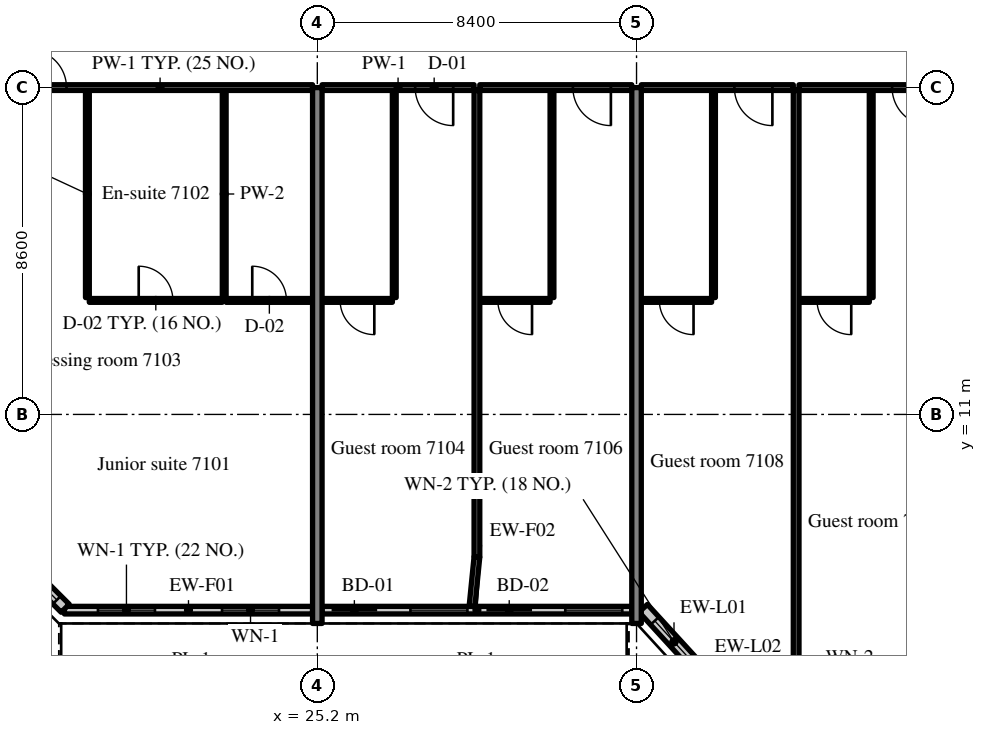
"""IFC4 building model, lengths in metres.
Left out: names, types, materials, properties, quantities, classifications, styles, units other than length and angle.
Written with IfcOpenShell. Run it as: python <this file> out.ifc"""

import sys

from ifc_helpers import new_model, si_unit, direction, frame, frame_2d, origin, place, context, subcontext, project, spatial, rectangle, extrude, source, transform, mapped, element, fill, save


model = new_model("IFC4")
c1 = context("Model", 3, precision=1e-05, world=origin(), true_north=direction((0.0, 1.0)))
c2 = subcontext(c1, "Body", "Model", "MODEL_VIEW")
j1 = project(units=[si_unit("LENGTHUNIT", "METRE"), si_unit("PLANEANGLEUNIT", "RADIAN")], contexts=[c1])
p1 = place(None, origin())
s1 = spatial("IfcSite", under=j1, at=p1, CompositionType="ELEMENT")
p2 = place(p1, origin())
s2 = spatial("IfcBuilding", under=s1, at=p2, CompositionType="ELEMENT")
p3 = place(p2, frame((0.0, 0.0, 297.7)))
s3 = spatial("IfcBuildingStorey", under=s2, at=p3, CompositionType="ELEMENT", Elevation=297.7)
m1 = source(origin(), c2, "Body", "SweptSolid", [
    extrude(rectangle(XDim=14.1, YDim=0.25, at=frame_2d((7.05, 0.0))), origin(), (0.0, 0.0, 1.0), 3.72),
])
for number, where, z_axis, x_axis in (
    (1, (25.2, 5.5, 0.0), (0.0, 0.0, 1.0), (0.0, 1.0, 0.0)),
    (2, (33.6, 5.5, 0.0), (0.0, 0.0, 1.0), (0.0, 1.0, 0.0)),
):
    element("IfcWall", number, at=place(p3, frame(where, z_axis=z_axis, x_axis=x_axis)), inside=s3, PredefinedType="SHEAR", context=c2, shape_type="MappedRepresentation", body=[
        mapped(m1, transform((0.0, 0.0, 0.0), scale=1.0)),
    ])
m2 = source(origin(), c2, "Body", "SweptSolid", [
    extrude(rectangle(XDim=6.53, YDim=0.2, at=frame_2d((3.265, 0.0))), origin(), (0.0, 0.0, 1.0), 3.17),
])
p4 = place(p3, frame((18.545, 5.85, 0.0), z_axis=(0.0, 0.0, 1.0), x_axis=(1.0, 0.0, 0.0)))
e3 = element("IfcWall", 3, at=p4, inside=s3, PredefinedType="SOLIDWALL", context=c2, shape_type="MappedRepresentation", body=[
    mapped(m2, transform((0.0, 0.0, 0.0), scale=1.0)),
])
m3 = source(origin(), c2, "Body", "SweptSolid", [
    extrude(rectangle(XDim=1.5, YDim=1.5, at=frame_2d((0.75, 0.75))), frame((0.0, 0.11, 0.0), z_axis=(0.0, -1.0, 0.0), x_axis=(1.0, 0.0, 0.0)), (0.0, 0.0, 1.0), 0.22),
])
p5 = place(p4, frame((0.883, 0.0, 0.9)))
e4 = element("IfcOpeningElement", 4, at=p5, cuts=e3, PredefinedType="OPENING", context=c2, shape_type="MappedRepresentation", body=[
    mapped(m3, transform((0.0, 0.0, 0.0), scale=1.0)),
])
p6 = place(p4, frame((4.147, 0.0, 0.9)))
e5 = element("IfcOpeningElement", 5, at=p6, cuts=e3, PredefinedType="OPENING", context=c2, shape_type="MappedRepresentation", body=[
    mapped(m3, transform((0.0, 0.0, 0.0), scale=1.0)),
])
m4 = source(origin(), c2, "Body", "SweptSolid", [
    extrude(rectangle(XDim=8.15, YDim=0.2, at=frame_2d((4.075, 0.0))), origin(), (0.0, 0.0, 1.0), 3.17),
])
p7 = place(p3, frame((25.325, 5.85, 0.0), z_axis=(0.0, 0.0, 1.0), x_axis=(1.0, 0.0, 0.0)))
e6 = element("IfcWall", 6, at=p7, inside=s3, PredefinedType="SOLIDWALL", context=c2, shape_type="MappedRepresentation", body=[
    mapped(m4, transform((0.0, 0.0, 0.0), scale=1.0)),
])
m5 = source(origin(), c2, "Body", "SweptSolid", [
    extrude(rectangle(XDim=1.2, YDim=2.4, at=frame_2d((0.6, 1.2))), frame((0.0, 0.11, 0.0), z_axis=(0.0, -1.0, 0.0), x_axis=(1.0, 0.0, 0.0)), (0.0, 0.0, 1.0), 0.22),
])
p8 = place(p7, frame((0.25, 0.0, 0.0)))
e7 = element("IfcOpeningElement", 7, at=p8, cuts=e6, PredefinedType="OPENING", context=c2, shape_type="MappedRepresentation", body=[
    mapped(m5, transform((0.0, 0.0, 0.0), scale=1.0)),
])
p9 = place(p7, frame((2.325, 0.0, 0.9)))
e8 = element("IfcOpeningElement", 8, at=p9, cuts=e6, PredefinedType="OPENING", context=c2, shape_type="MappedRepresentation", body=[
    mapped(m3, transform((0.0, 0.0, 0.0), scale=1.0)),
])
p10 = place(p7, frame((4.325, 0.0, 0.0)))
e9 = element("IfcOpeningElement", 9, at=p10, cuts=e6, PredefinedType="OPENING", context=c2, shape_type="MappedRepresentation", body=[
    mapped(m5, transform((0.0, 0.0, 0.0), scale=1.0)),
])
p11 = place(p7, frame((6.4, 0.0, 0.9)))
e10 = element("IfcOpeningElement", 10, at=p11, cuts=e6, PredefinedType="OPENING", context=c2, shape_type="MappedRepresentation", body=[
    mapped(m3, transform((0.0, 0.0, 0.0), scale=1.0)),
])
m6 = source(origin(), c2, "Body", "SweptSolid", [
    extrude(rectangle(XDim=2.398, YDim=0.3, at=frame_2d((1.199, 0.0))), origin(), (0.0, 0.0, 1.0), 3.72),
])
p12 = place(p3, frame((33.776, 5.9, 0.0), z_axis=(0.0, 0.0, 1.0), x_axis=(0.675374189419, -0.737475222815, 0.0)))
e11 = element("IfcWall", 11, at=p12, inside=s3, PredefinedType="SOLIDWALL", context=c2, shape_type="MappedRepresentation", body=[
    mapped(m6, transform((0.0, 0.0, 0.0), scale=1.0)),
])
m7 = source(origin(), c2, "Body", "SweptSolid", [
    extrude(rectangle(XDim=1.5, YDim=2.0, at=frame_2d((0.75, 1.0))), frame((0.0, 0.16, 0.0), z_axis=(0.0, -1.0, 0.0), x_axis=(1.0, 0.0, 0.0)), (0.0, 0.0, 1.0), 0.32),
])
p13 = place(p12, frame((0.449, 0.0, 0.9)))
e12 = element("IfcOpeningElement", 12, at=p13, cuts=e11, PredefinedType="OPENING", context=c2, shape_type="MappedRepresentation", body=[
    mapped(m7, transform((0.0, 0.0, 0.0), scale=1.0)),
])
m8 = source(origin(), c2, "Body", "SweptSolid", [
    extrude(rectangle(XDim=5.326, YDim=0.3, at=frame_2d((2.663, 0.0))), origin(), (0.0, 0.0, 1.0), 3.72),
])
p14 = place(p3, frame((14.8, 9.666, 0.0), z_axis=(0.0, 0.0, 1.0), x_axis=(0.707083859269, -0.707129702361, 0.0)))
e13 = element("IfcWall", 13, at=p14, inside=s3, PredefinedType="SOLIDWALL", context=c2, shape_type="MappedRepresentation", body=[
    mapped(m8, transform((0.0, 0.0, 0.0), scale=1.0)),
])
m9 = source(origin(), c2, "Body", "SweptSolid", [
    extrude(rectangle(XDim=1.2, YDim=1.5, at=frame_2d((0.6, 0.75))), frame((0.0, 0.16, 0.0), z_axis=(0.0, -1.0, 0.0), x_axis=(1.0, 0.0, 0.0)), (0.0, 0.0, 1.0), 0.32),
])
p15 = place(p14, frame((3.815, 0.0, 0.9)))
e14 = element("IfcOpeningElement", 14, at=p15, cuts=e13, PredefinedType="OPENING", context=c2, shape_type="MappedRepresentation", body=[
    mapped(m9, transform((0.0, 0.0, 0.0), scale=1.0)),
])
m10 = source(origin(), c2, "Body", "SweptSolid", [
    extrude(rectangle(XDim=5.45, YDim=0.1, at=frame_2d((2.725, 0.0))), origin(), (0.0, 0.0, 1.0), 3.72),
])
for number, where, z_axis, x_axis in (
    (15, (19.15, 14.075, 0.0), (0.0, 0.0, 1.0), (0.0, 1.0, 0.0)),
    (16, (22.75, 14.075, 0.0), (0.0, 0.0, 1.0), (0.0, 1.0, 0.0)),
):
    element("IfcWall", number, at=place(p3, frame(where, z_axis=z_axis, x_axis=x_axis)), inside=s3, PredefinedType="PARTITIONING", context=c2, shape_type="MappedRepresentation", body=[
        mapped(m10, transform((0.0, 0.0, 0.0), scale=1.0)),
    ])
m11 = source(origin(), c2, "Body", "SweptSolid", [
    extrude(rectangle(XDim=3.5, YDim=0.1, at=frame_2d((1.75, 0.0))), origin(), (0.0, 0.0, 1.0), 3.72),
])
p16 = place(p3, frame((19.2, 14.0, 0.0), z_axis=(0.0, 0.0, 1.0), x_axis=(1.0, 0.0, 0.0)))
e17 = element("IfcWall", 17, at=p16, inside=s3, PredefinedType="PARTITIONING", context=c2, shape_type="MappedRepresentation", body=[
    mapped(m11, transform((0.0, 0.0, 0.0), scale=1.0)),
])
m12 = source(origin(), c2, "Body", "SweptSolid", [
    extrude(rectangle(XDim=0.9, YDim=2.1, at=frame_2d((0.45, 1.05))), frame((0.0, 0.06, 0.0), z_axis=(0.0, -1.0, 0.0), x_axis=(1.0, 0.0, 0.0)), (0.0, 0.0, 1.0), 0.12),
])
p17 = place(p16, frame((1.3, 0.0, 0.0)))
e18 = element("IfcOpeningElement", 18, at=p17, cuts=e17, PredefinedType="OPENING", context=c2, shape_type="MappedRepresentation", body=[
    mapped(m12, transform((0.0, 0.0, 0.0), scale=1.0)),
])
m13 = source(origin(), c2, "Body", "SweptSolid", [
    extrude(rectangle(XDim=2.275, YDim=0.1, at=frame_2d((1.137, 0.0))), origin(), (0.0, 0.0, 1.0), 3.72),
])
p18 = place(p3, frame((22.8, 14.0, 0.0), z_axis=(0.0, 0.0, 1.0), x_axis=(1.0, 0.0, 0.0)))
e19 = element("IfcWall", 19, at=p18, inside=s3, PredefinedType="PARTITIONING", context=c2, shape_type="MappedRepresentation", body=[
    mapped(m13, transform((0.0, 0.0, 0.0), scale=1.0)),
])
p19 = place(p18, frame((0.688, 0.0, 0.0)))
e20 = element("IfcOpeningElement", 20, at=p19, cuts=e19, PredefinedType="OPENING", context=c2, shape_type="MappedRepresentation", body=[
    mapped(m12, transform((0.0, 0.0, 0.0), scale=1.0)),
])
m14 = source(origin(), c2, "Body", "SweptSolid", [
    extrude(rectangle(XDim=8.025, YDim=0.15, at=frame_2d((4.012, 0.0))), origin(), (0.0, 0.0, 1.0), 3.02),
])
p20 = place(p3, frame((17.05, 19.6, 0.0), z_axis=(0.0, 0.0, 1.0), x_axis=(1.0, 0.0, 0.0)))
e21 = element("IfcWall", 21, at=p20, inside=s3, PredefinedType="PARTITIONING", context=c2, shape_type="MappedRepresentation", body=[
    mapped(m14, transform((0.0, 0.0, 0.0), scale=1.0)),
])
m15 = source(origin(), c2, "Body", "SweptSolid", [
    extrude(rectangle(XDim=1.0, YDim=2.1, at=frame_2d((0.5, 1.05))), frame((0.0, 0.085, 0.0), z_axis=(0.0, -1.0, 0.0), x_axis=(1.0, 0.0, 0.0)), (0.0, 0.0, 1.0), 0.17),
])
p21 = place(p20, frame((0.55, 0.0, 0.0)))
e22 = element("IfcOpeningElement", 22, at=p21, cuts=e21, PredefinedType="OPENING", context=c2, shape_type="MappedRepresentation", body=[
    mapped(m15, transform((0.0, 0.0, 0.0), scale=1.0)),
])
p22 = place(p3, frame((27.225, 14.075, 0.0), z_axis=(0.0, 0.0, 1.0), x_axis=(0.0, 1.0, 0.0)))
e23 = element("IfcWall", 23, at=p22, inside=s3, PredefinedType="PARTITIONING", context=c2, shape_type="MappedRepresentation", body=[
    mapped(m10, transform((0.0, 0.0, 0.0), scale=1.0)),
])
m16 = source(origin(), c2, "Body", "SweptSolid", [
    extrude(rectangle(XDim=1.85, YDim=0.1, at=frame_2d((0.925, 0.0))), origin(), (0.0, 0.0, 1.0), 3.72),
])
p23 = place(p3, frame((25.325, 14.0, 0.0), z_axis=(0.0, 0.0, 1.0), x_axis=(1.0, 0.0, 0.0)))
e24 = element("IfcWall", 24, at=p23, inside=s3, PredefinedType="PARTITIONING", context=c2, shape_type="MappedRepresentation", body=[
    mapped(m16, transform((0.0, 0.0, 0.0), scale=1.0)),
])
p24 = place(p23, frame((0.475, 0.0, 0.0)))
e25 = element("IfcOpeningElement", 25, at=p24, cuts=e24, PredefinedType="OPENING", context=c2, shape_type="MappedRepresentation", body=[
    mapped(m12, transform((0.0, 0.0, 0.0), scale=1.0)),
])
m17 = source(origin(), c2, "Body", "SweptSolid", [
    extrude(rectangle(XDim=4.0, YDim=0.15, at=frame_2d((2.0, 0.0))), origin(), (0.0, 0.0, 1.0), 3.02),
])
p25 = place(p3, frame((25.325, 19.6, 0.0), z_axis=(0.0, 0.0, 1.0), x_axis=(1.0, 0.0, 0.0)))
e26 = element("IfcWall", 26, at=p25, inside=s3, PredefinedType="PARTITIONING", context=c2, shape_type="MappedRepresentation", body=[
    mapped(m17, transform((0.0, 0.0, 0.0), scale=1.0)),
])
p26 = place(p25, frame((2.45, 0.0, 0.0)))
e27 = element("IfcOpeningElement", 27, at=p26, cuts=e26, PredefinedType="OPENING", context=c2, shape_type="MappedRepresentation", body=[
    mapped(m15, transform((0.0, 0.0, 0.0), scale=1.0)),
])
p27 = place(p3, frame((31.375, 14.075, 0.0), z_axis=(0.0, 0.0, 1.0), x_axis=(0.0, 1.0, 0.0)))
e28 = element("IfcWall", 28, at=p27, inside=s3, PredefinedType="PARTITIONING", context=c2, shape_type="MappedRepresentation", body=[
    mapped(m10, transform((0.0, 0.0, 0.0), scale=1.0)),
])
m18 = source(origin(), c2, "Body", "SweptSolid", [
    extrude(rectangle(XDim=1.85, YDim=0.1, at=frame_2d((0.925, 0.0))), origin(), (0.0, 0.0, 1.0), 3.72),
])
p28 = place(p3, frame((29.475, 14.0, 0.0), z_axis=(0.0, 0.0, 1.0), x_axis=(1.0, 0.0, 0.0)))
e29 = element("IfcWall", 29, at=p28, inside=s3, PredefinedType="PARTITIONING", context=c2, shape_type="MappedRepresentation", body=[
    mapped(m18, transform((0.0, 0.0, 0.0), scale=1.0)),
])
p29 = place(p28, frame((0.475, 0.0, 0.0)))
e30 = element("IfcOpeningElement", 30, at=p29, cuts=e29, PredefinedType="OPENING", context=c2, shape_type="MappedRepresentation", body=[
    mapped(m12, transform((0.0, 0.0, 0.0), scale=1.0)),
])
p30 = place(p3, frame((29.475, 19.6, 0.0), z_axis=(0.0, 0.0, 1.0), x_axis=(1.0, 0.0, 0.0)))
e31 = element("IfcWall", 31, at=p30, inside=s3, PredefinedType="PARTITIONING", context=c2, shape_type="MappedRepresentation", body=[
    mapped(m17, transform((0.0, 0.0, 0.0), scale=1.0)),
])
p31 = place(p30, frame((2.45, 0.0, 0.0)))
e32 = element("IfcOpeningElement", 32, at=p31, cuts=e31, PredefinedType="OPENING", context=c2, shape_type="MappedRepresentation", body=[
    mapped(m15, transform((0.0, 0.0, 0.0), scale=1.0)),
])
m19 = source(origin(), c2, "Body", "SweptSolid", [
    extrude(rectangle(XDim=12.275, YDim=0.15, at=frame_2d((6.137, 0.0))), origin(), (0.0, 0.0, 1.0), 3.72),
])
p32 = place(p3, frame((29.4, 7.25, 0.0), z_axis=(0.0, 0.0, 1.0), x_axis=(0.0, 1.0, 0.0)))
e33 = element("IfcWall", 33, at=p32, inside=s3, PredefinedType="PARTITIONING", context=c2, shape_type="MappedRepresentation", body=[
    mapped(m19, transform((0.0, 0.0, 0.0), scale=1.0)),
])
p33 = place(p3, frame((35.625, 14.075, 0.0), z_axis=(0.0, 0.0, 1.0), x_axis=(0.0, 1.0, 0.0)))
e34 = element("IfcWall", 34, at=p33, inside=s3, PredefinedType="PARTITIONING", context=c2, shape_type="MappedRepresentation", body=[
    mapped(m10, transform((0.0, 0.0, 0.0), scale=1.0)),
])
p34 = place(p3, frame((33.725, 14.0, 0.0), z_axis=(0.0, 0.0, 1.0), x_axis=(1.0, 0.0, 0.0)))
e35 = element("IfcWall", 35, at=p34, inside=s3, PredefinedType="PARTITIONING", context=c2, shape_type="MappedRepresentation", body=[
    mapped(m18, transform((0.0, 0.0, 0.0), scale=1.0)),
])
p35 = place(p34, frame((0.475, 0.0, 0.0)))
e36 = element("IfcOpeningElement", 36, at=p35, cuts=e35, PredefinedType="OPENING", context=c2, shape_type="MappedRepresentation", body=[
    mapped(m12, transform((0.0, 0.0, 0.0), scale=1.0)),
])
p36 = place(p3, frame((33.725, 19.6, 0.0), z_axis=(0.0, 0.0, 1.0), x_axis=(1.0, 0.0, 0.0)))
e37 = element("IfcWall", 37, at=p36, inside=s3, PredefinedType="PARTITIONING", context=c2, shape_type="MappedRepresentation", body=[
    mapped(m17, transform((0.0, 0.0, 0.0), scale=1.0)),
])
p37 = place(p36, frame((2.45, 0.0, 0.0)))
e38 = element("IfcOpeningElement", 38, at=p37, cuts=e37, PredefinedType="OPENING", context=c2, shape_type="MappedRepresentation", body=[
    mapped(m15, transform((0.0, 0.0, 0.0), scale=1.0)),
])
p38 = place(p3, frame((39.775, 14.075, 0.0), z_axis=(0.0, 0.0, 1.0), x_axis=(0.0, 1.0, 0.0)))
e39 = element("IfcWall", 39, at=p38, inside=s3, PredefinedType="PARTITIONING", context=c2, shape_type="MappedRepresentation", body=[
    mapped(m10, transform((0.0, 0.0, 0.0), scale=1.0)),
])
p39 = place(p3, frame((37.875, 14.0, 0.0), z_axis=(0.0, 0.0, 1.0), x_axis=(1.0, 0.0, 0.0)))
e40 = element("IfcWall", 40, at=p39, inside=s3, PredefinedType="PARTITIONING", context=c2, shape_type="MappedRepresentation", body=[
    mapped(m16, transform((0.0, 0.0, 0.0), scale=1.0)),
])
p40 = place(p39, frame((0.475, 0.0, 0.0)))
e41 = element("IfcOpeningElement", 41, at=p40, cuts=e40, PredefinedType="OPENING", context=c2, shape_type="MappedRepresentation", body=[
    mapped(m12, transform((0.0, 0.0, 0.0), scale=1.0)),
])
p41 = place(p3, frame((37.875, 19.6, 0.0), z_axis=(0.0, 0.0, 1.0), x_axis=(1.0, 0.0, 0.0)))
e42 = element("IfcWall", 42, at=p41, inside=s3, PredefinedType="PARTITIONING", context=c2, shape_type="MappedRepresentation", body=[
    mapped(m17, transform((0.0, 0.0, 0.0), scale=1.0)),
])
p42 = place(p41, frame((2.45, 0.0, 0.0)))
e43 = element("IfcOpeningElement", 43, at=p42, cuts=e42, PredefinedType="OPENING", context=c2, shape_type="MappedRepresentation", body=[
    mapped(m15, transform((0.0, 0.0, 0.0), scale=1.0)),
])
m20 = source(origin(), c2, "Body", "SweptSolid", [
    extrude(rectangle(XDim=15.498, YDim=0.15, at=frame_2d((7.749, 0.0))), origin(), (0.0, 0.0, 1.0), 3.72),
])
p43 = place(p3, frame((37.8, 4.027, 0.0), z_axis=(0.0, 0.0, 1.0), x_axis=(0.0, 1.0, 0.0)))
e44 = element("IfcWall", 44, at=p43, inside=s3, PredefinedType="PARTITIONING", context=c2, shape_type="MappedRepresentation", body=[
    mapped(m20, transform((0.0, 0.0, 0.0), scale=1.0)),
])
m21 = source(origin(), c2, "Body", "SweptSolid", [
    extrude(rectangle(XDim=1.307, YDim=0.15, at=frame_2d((0.653, 0.0))), origin(), (0.0, 0.0, 1.0), 3.72),
])
p44 = place(p3, frame((29.27, 5.95, 0.0), z_axis=(0.0, 0.0, 1.0), x_axis=(0.099411212066, 0.995046436562, 0.0)))
e45 = element("IfcWall", 45, at=p44, inside=s3, PredefinedType="PARTITIONING", context=c2, shape_type="MappedRepresentation", body=[
    mapped(m21, transform((0.0, 0.0, 0.0), scale=1.0)),
])
m22 = source(origin(), c2, "Body", "SweptSolid", [
    extrude(rectangle(XDim=1.5, YDim=1.5, at=frame_2d((0.75, 0.75))), frame((0.0, 0.03, 0.0), z_axis=(0.0, -1.0, 0.0), x_axis=(1.0, 0.0, 0.0)), (0.0, 0.0, 1.0), 0.06),
])
p45 = place(p5, origin())
e46 = element("IfcWindow", 46, at=p45, inside=s3, PartitioningType="SINGLE_PANEL", PredefinedType="WINDOW", context=c2, shape_type="MappedRepresentation", body=[
    mapped(m22, transform((0.0, 0.0, 0.0), scale=1.0)),
])
fill(e4, e46)
p46 = place(p6, origin())
e47 = element("IfcWindow", 47, at=p46, inside=s3, PartitioningType="SINGLE_PANEL", PredefinedType="WINDOW", context=c2, shape_type="MappedRepresentation", body=[
    mapped(m22, transform((0.0, 0.0, 0.0), scale=1.0)),
])
fill(e5, e47)
m23 = source(origin(), c2, "Body", "SweptSolid", [
    extrude(rectangle(XDim=1.2, YDim=2.4, at=frame_2d((0.6, 1.2))), frame((0.0, 0.025, 0.0), z_axis=(0.0, -1.0, 0.0), x_axis=(1.0, 0.0, 0.0)), (0.0, 0.0, 1.0), 0.05),
])
p47 = place(p8, origin())
e48 = element("IfcDoor", 48, at=p47, inside=s3, OperationType="SLIDING_TO_LEFT", PredefinedType="DOOR", context=c2, shape_type="MappedRepresentation", body=[
    mapped(m23, transform((0.0, 0.0, 0.0), scale=1.0)),
])
fill(e7, e48)
p48 = place(p9, origin())
e49 = element("IfcWindow", 49, at=p48, inside=s3, PartitioningType="SINGLE_PANEL", PredefinedType="WINDOW", context=c2, shape_type="MappedRepresentation", body=[
    mapped(m22, transform((0.0, 0.0, 0.0), scale=1.0)),
])
fill(e8, e49)
p49 = place(p10, origin())
e50 = element("IfcDoor", 50, at=p49, inside=s3, OperationType="SLIDING_TO_RIGHT", PredefinedType="DOOR", context=c2, shape_type="MappedRepresentation", body=[
    mapped(m23, transform((0.0, 0.0, 0.0), scale=1.0)),
])
fill(e9, e50)
p50 = place(p11, origin())
e51 = element("IfcWindow", 51, at=p50, inside=s3, PartitioningType="SINGLE_PANEL", PredefinedType="WINDOW", context=c2, shape_type="MappedRepresentation", body=[
    mapped(m22, transform((0.0, 0.0, 0.0), scale=1.0)),
])
fill(e10, e51)
m24 = source(origin(), c2, "Body", "SweptSolid", [
    extrude(rectangle(XDim=1.5, YDim=2.0, at=frame_2d((0.75, 1.0))), frame((0.0, 0.03, 0.0), z_axis=(0.0, -1.0, 0.0), x_axis=(1.0, 0.0, 0.0)), (0.0, 0.0, 1.0), 0.06),
])
p51 = place(p13, origin())
e52 = element("IfcWindow", 52, at=p51, inside=s3, PartitioningType="SINGLE_PANEL", PredefinedType="WINDOW", context=c2, shape_type="MappedRepresentation", body=[
    mapped(m24, transform((0.0, 0.0, 0.0), scale=1.0)),
])
fill(e12, e52)
m25 = source(origin(), c2, "Body", "SweptSolid", [
    extrude(rectangle(XDim=1.2, YDim=1.5, at=frame_2d((0.6, 0.75))), frame((0.0, 0.03, 0.0), z_axis=(0.0, -1.0, 0.0), x_axis=(1.0, 0.0, 0.0)), (0.0, 0.0, 1.0), 0.06),
])
p52 = place(p15, origin())
e53 = element("IfcWindow", 53, at=p52, inside=s3, PartitioningType="SINGLE_PANEL", PredefinedType="WINDOW", context=c2, shape_type="MappedRepresentation", body=[
    mapped(m25, transform((0.0, 0.0, 0.0), scale=1.0)),
])
fill(e14, e53)
m26 = source(origin(), c2, "Body", "SweptSolid", [
    extrude(rectangle(XDim=0.9, YDim=2.1, at=frame_2d((0.45, 1.05))), frame((0.0, 0.025, 0.0), z_axis=(0.0, -1.0, 0.0), x_axis=(1.0, 0.0, 0.0)), (0.0, 0.0, 1.0), 0.05),
])
p53 = place(p17, origin())
e54 = element("IfcDoor", 54, at=p53, inside=s3, OperationType="SINGLE_SWING_LEFT", PredefinedType="DOOR", context=c2, shape_type="MappedRepresentation", body=[
    mapped(m26, transform((0.0, 0.0, 0.0), scale=1.0)),
])
fill(e18, e54)
p54 = place(p19, origin())
e55 = element("IfcDoor", 55, at=p54, inside=s3, OperationType="SINGLE_SWING_LEFT", PredefinedType="DOOR", context=c2, shape_type="MappedRepresentation", body=[
    mapped(m26, transform((0.0, 0.0, 0.0), scale=1.0)),
])
fill(e20, e55)
m27 = source(origin(), c2, "Body", "SweptSolid", [
    extrude(rectangle(XDim=1.0, YDim=2.1, at=frame_2d((0.5, 1.05))), frame((0.0, 0.025, 0.0), z_axis=(0.0, -1.0, 0.0), x_axis=(1.0, 0.0, 0.0)), (0.0, 0.0, 1.0), 0.05),
])
p55 = place(p21, origin())
e56 = element("IfcDoor", 56, at=p55, inside=s3, OperationType="SINGLE_SWING_LEFT", PredefinedType="DOOR", context=c2, shape_type="MappedRepresentation", body=[
    mapped(m27, transform((0.0, 0.0, 0.0), scale=1.0)),
])
fill(e22, e56)
p56 = place(p24, origin())
e57 = element("IfcDoor", 57, at=p56, inside=s3, OperationType="SINGLE_SWING_RIGHT", PredefinedType="DOOR", context=c2, shape_type="MappedRepresentation", body=[
    mapped(m26, transform((0.0, 0.0, 0.0), scale=1.0)),
])
fill(e25, e57)
p57 = place(p26, origin())
e58 = element("IfcDoor", 58, at=p57, inside=s3, OperationType="SINGLE_SWING_RIGHT", PredefinedType="DOOR", context=c2, shape_type="MappedRepresentation", body=[
    mapped(m27, transform((0.0, 0.0, 0.0), scale=1.0)),
])
fill(e27, e58)
p58 = place(p29, origin())
e59 = element("IfcDoor", 59, at=p58, inside=s3, OperationType="SINGLE_SWING_RIGHT", PredefinedType="DOOR", context=c2, shape_type="MappedRepresentation", body=[
    mapped(m26, transform((0.0, 0.0, 0.0), scale=1.0)),
])
fill(e30, e59)
p59 = place(p31, origin())
e60 = element("IfcDoor", 60, at=p59, inside=s3, OperationType="SINGLE_SWING_RIGHT", PredefinedType="DOOR", context=c2, shape_type="MappedRepresentation", body=[
    mapped(m27, transform((0.0, 0.0, 0.0), scale=1.0)),
])
fill(e32, e60)
p60 = place(p35, origin())
e61 = element("IfcDoor", 61, at=p60, inside=s3, OperationType="SINGLE_SWING_RIGHT", PredefinedType="DOOR", context=c2, shape_type="MappedRepresentation", body=[
    mapped(m26, transform((0.0, 0.0, 0.0), scale=1.0)),
])
fill(e36, e61)
p61 = place(p37, origin())
e62 = element("IfcDoor", 62, at=p61, inside=s3, OperationType="SINGLE_SWING_RIGHT", PredefinedType="DOOR", context=c2, shape_type="MappedRepresentation", body=[
    mapped(m27, transform((0.0, 0.0, 0.0), scale=1.0)),
])
fill(e38, e62)
p62 = place(p40, origin())
e63 = element("IfcDoor", 63, at=p62, inside=s3, OperationType="SINGLE_SWING_RIGHT", PredefinedType="DOOR", context=c2, shape_type="MappedRepresentation", body=[
    mapped(m26, transform((0.0, 0.0, 0.0), scale=1.0)),
])
fill(e41, e63)
p63 = place(p42, origin())
e64 = element("IfcDoor", 64, at=p63, inside=s3, OperationType="SINGLE_SWING_RIGHT", PredefinedType="DOOR", context=c2, shape_type="MappedRepresentation", body=[
    mapped(m27, transform((0.0, 0.0, 0.0), scale=1.0)),
])
fill(e43, e64)
save(model, sys.argv[1])
